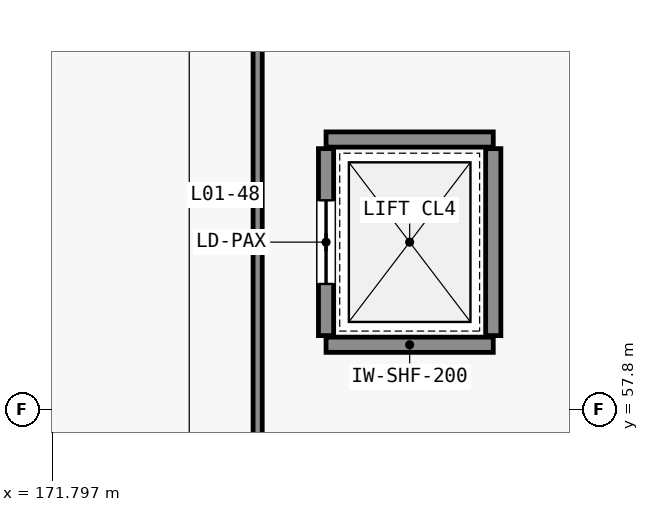
"""IFC4 building model, lengths in metres.
Left out: names, types, materials, properties, quantities, classifications, styles, units other than length and angle.
Written with IfcOpenShell. Run it as: python <this file> out.ifc"""

import sys

from ifc_helpers import new_model, si_unit, direction, frame, frame_2d, origin, place, context, subcontext, project, spatial, rectangle, extrude, element, fill, save


model = new_model("IFC4")
c1 = context("Model", 3, precision=1e-05, world=origin(), true_north=direction((0.0, 1.0)))
c2 = subcontext(c1, "Body", "Model", "MODEL_VIEW")
j1 = project(units=[si_unit("LENGTHUNIT", "METRE"), si_unit("PLANEANGLEUNIT", "RADIAN")], contexts=[c1])
p1 = place(None, origin())
s1 = spatial("IfcSite", under=j1, at=p1, CompositionType="ELEMENT")
p2 = place(p1, origin())
s2 = spatial("IfcBuilding", under=s1, at=p2, CompositionType="ELEMENT")
p3 = place(p2, frame((0.0, 0.0, 6.0)))
s3 = spatial("IfcBuildingStorey", under=s2, at=p3, CompositionType="ELEMENT", Elevation=6.0)
for number, where, z_axis, x_axis in (
    (1, (175.4, 58.65, 0.0), (0.0, 0.0, 1.0), (1.0, 0.0, 0.0)),
    (2, (175.4, 61.35, 0.0), (0.0, 0.0, 1.0), (1.0, 0.0, 0.0)),
):
    element("IfcWall", number, at=place(p3, frame(where, z_axis=z_axis, x_axis=x_axis)), inside=s3, PredefinedType="STANDARD", context=c2, shape_type="SweptSolid", body=[
        extrude(rectangle(XDim=2.2, YDim=0.2, at=frame_2d((1.1, 0.0))), origin(), (0.0, 0.0, 1.0), 4.347),
    ])
p4 = place(p3, frame((175.4, 58.77, 0.0), z_axis=(0.0, 0.0, 1.0), x_axis=(0.0, 1.0, 0.0)))
e3 = element("IfcWall", 3, at=p4, inside=s3, PredefinedType="STANDARD", context=c2, shape_type="SweptSolid", body=[
    extrude(rectangle(XDim=2.46, YDim=0.2, at=frame_2d((1.23, 0.0))), origin(), (0.0, 0.0, 1.0), 5.04),
])
p5 = place(p4, frame((0.68, 0.0, 0.0)))
e4 = element("IfcOpeningElement", 4, at=p5, cuts=e3, PredefinedType="OPENING", context=c2, shape_type="SweptSolid", body=[
    extrude(rectangle(XDim=1.1, YDim=2.15, at=frame_2d((0.55, 1.075))), frame((0.0, 0.11, 0.0), z_axis=(0.0, -1.0, 0.0), x_axis=(1.0, 0.0, 0.0)), (0.0, 0.0, 1.0), 0.22),
])
p6 = place(p3, frame((177.6, 58.77, 0.0), z_axis=(0.0, 0.0, 1.0), x_axis=(0.0, 1.0, 0.0)))
e5 = element("IfcWall", 5, at=p6, inside=s3, PredefinedType="STANDARD", context=c2, shape_type="SweptSolid", body=[
    extrude(rectangle(XDim=2.46, YDim=0.2, at=frame_2d((1.23, 0.0))), origin(), (0.0, 0.0, 1.0), 5.04),
])
p7 = place(p3, frame((174.5, 16.62, 0.0), z_axis=(0.0, 0.0, 1.0), x_axis=(0.0, 1.0, 0.0)))
e6 = element("IfcWall", 6, at=p7, inside=s3, PredefinedType="PARTITIONING", context=c2, shape_type="SweptSolid", body=[
    extrude(rectangle(XDim=48.76, YDim=0.12, at=frame_2d((24.38, 0.0))), origin(), (0.0, 0.0, 1.0), 4.347),
])
p8 = place(p5, origin())
e7 = element("IfcDoor", 7, at=p8, inside=s3, OperationType="SLIDING_TO_LEFT", PredefinedType="DOOR", context=c2, shape_type="SweptSolid", body=[
    extrude(rectangle(XDim=1.1, YDim=2.15, at=frame_2d((0.55, 1.075))), frame((0.0, 0.025, 0.0), z_axis=(0.0, -1.0, 0.0), x_axis=(1.0, 0.0, 0.0)), (0.0, 0.0, 1.0), 0.05),
])
fill(e4, e7)
save(model, sys.argv[1])
